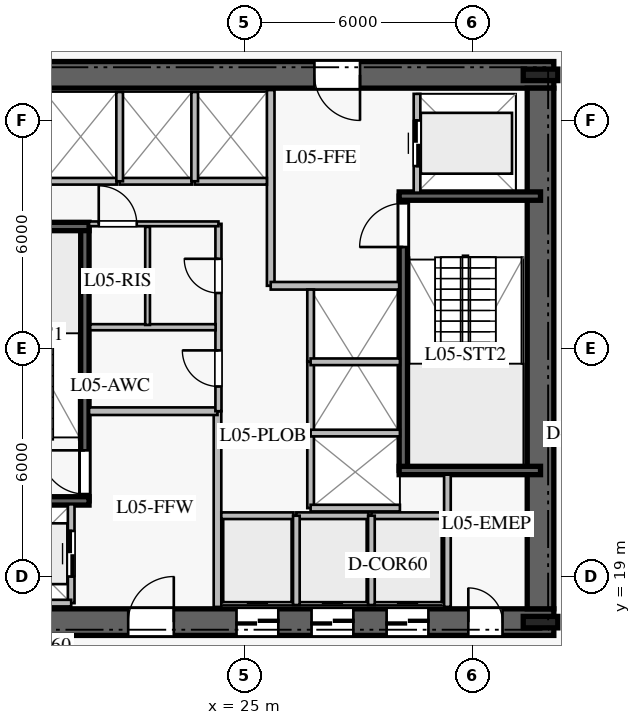
"""IFC4 building model, lengths in metres.
Left out: names, types, materials, properties, quantities, classifications, styles, units other than length and angle.
Written with IfcOpenShell. Run it as: python <this file> out.ifc"""

import sys

from ifc_helpers import new_model, si_unit, direction, frame, frame_2d, origin, origin_2d, place, context, subcontext, project, spatial, rectangle, i_section, extrude, element, fill, save


model = new_model("IFC4")
c1 = context("Model", 3, precision=1e-05, world=origin(), true_north=direction((0.0, 1.0)))
c2 = subcontext(c1, "Body", "Model", "MODEL_VIEW")
j1 = project(units=[si_unit("LENGTHUNIT", "METRE"), si_unit("PLANEANGLEUNIT", "RADIAN")], contexts=[c1])
p1 = place(None, origin())
s1 = spatial("IfcSite", under=j1, at=p1, CompositionType="ELEMENT")
p2 = place(p1, origin())
s2 = spatial("IfcBuilding", under=s1, at=p2, CompositionType="ELEMENT")
p3 = place(p2, frame((0.0, 0.0, 24.0)))
s3 = spatial("IfcBuildingStorey", under=s2, at=p3, CompositionType="ELEMENT", Elevation=24.0)
p4 = place(p3, frame((16.85, 17.8, 0.0), z_axis=(0.0, 0.0, 1.0), x_axis=(1.0, 0.0, 0.0)))
e1 = element("IfcWall", 1, at=p4, inside=s3, PredefinedType="SHEAR", context=c2, shape_type="SweptSolid", body=[
    extrude(rectangle(XDim=16.3, YDim=0.7, at=frame_2d((8.15, 0.0))), origin(), (0.0, 0.0, 1.0), 3.76),
])
p5 = place(p4, frame((5.1, 0.0, 0.0)))
e2 = element("IfcOpeningElement", 2, at=p5, cuts=e1, PredefinedType="OPENING", context=c2, shape_type="SweptSolid", body=[
    extrude(rectangle(XDim=1.2, YDim=2.25, at=frame_2d((0.6, 1.125))), frame((0.0, 0.36, 0.0), z_axis=(0.0, -1.0, 0.0), x_axis=(1.0, 0.0, 0.0)), (0.0, 0.0, 1.0), 0.72),
])
p6 = place(p4, frame((14.05, 0.0, 0.0)))
e3 = element("IfcOpeningElement", 3, at=p6, cuts=e1, PredefinedType="OPENING", context=c2, shape_type="SweptSolid", body=[
    extrude(rectangle(XDim=0.9, YDim=2.1, at=frame_2d((0.45, 1.05))), frame((0.0, 0.36, 0.0), z_axis=(0.0, -1.0, 0.0), x_axis=(1.0, 0.0, 0.0)), (0.0, 0.0, 1.0), 0.72),
])
p7 = place(p4, frame((7.95, 0.0, 0.0)))
e4 = element("IfcOpeningElement", 4, at=p7, cuts=e1, PredefinedType="OPENING", context=c2, shape_type="SweptSolid", body=[
    extrude(rectangle(XDim=1.1, YDim=2.2, at=frame_2d((0.55, 1.1))), frame((0.0, 0.36, 0.0), z_axis=(0.0, -1.0, 0.0), x_axis=(1.0, 0.0, 0.0)), (0.0, 0.0, 1.0), 0.72),
])
p8 = place(p4, frame((9.925, 0.0, 0.0)))
e5 = element("IfcOpeningElement", 5, at=p8, cuts=e1, PredefinedType="OPENING", context=c2, shape_type="SweptSolid", body=[
    extrude(rectangle(XDim=1.1, YDim=2.2, at=frame_2d((0.55, 1.1))), frame((0.0, 0.36, 0.0), z_axis=(0.0, -1.0, 0.0), x_axis=(1.0, 0.0, 0.0)), (0.0, 0.0, 1.0), 0.72),
])
p9 = place(p4, frame((11.9, 0.0, 0.0)))
e6 = element("IfcOpeningElement", 6, at=p9, cuts=e1, PredefinedType="OPENING", context=c2, shape_type="SweptSolid", body=[
    extrude(rectangle(XDim=1.1, YDim=2.2, at=frame_2d((0.55, 1.1))), frame((0.0, 0.36, 0.0), z_axis=(0.0, -1.0, 0.0), x_axis=(1.0, 0.0, 0.0)), (0.0, 0.0, 1.0), 0.72),
])
p10 = place(p3, frame((33.15, 32.2, 0.0), z_axis=(0.0, 0.0, 1.0), x_axis=(-1.0, 0.0, 0.0)))
e7 = element("IfcWall", 7, at=p10, inside=s3, PredefinedType="SHEAR", context=c2, shape_type="SweptSolid", body=[
    extrude(rectangle(XDim=16.3, YDim=0.7, at=frame_2d((8.15, 0.0))), origin(), (0.0, 0.0, 1.0), 3.76),
])
p11 = place(p10, frame((5.1, 0.0, 0.0)))
e8 = element("IfcOpeningElement", 8, at=p11, cuts=e7, PredefinedType="OPENING", context=c2, shape_type="SweptSolid", body=[
    extrude(rectangle(XDim=1.2, YDim=2.25, at=frame_2d((0.6, 1.125))), frame((0.0, 0.36, 0.0), z_axis=(0.0, -1.0, 0.0), x_axis=(1.0, 0.0, 0.0)), (0.0, 0.0, 1.0), 0.72),
])
p12 = place(p3, frame((32.8, 18.15, 0.0), z_axis=(0.0, 0.0, 1.0), x_axis=(0.0, 1.0, 0.0)))
e9 = element("IfcWall", 9, at=p12, inside=s3, PredefinedType="SHEAR", context=c2, shape_type="SweptSolid", body=[
    extrude(rectangle(XDim=13.7, YDim=0.7, at=frame_2d((6.85, 0.0))), origin(), (0.0, 0.0, 1.0), 3.76),
])
for number, where, z_axis, x_axis in (
    (10, (32.8, 17.8, 0.0), (0.0, 0.0, 1.0), (1.0, 0.0, 0.0)),
    (11, (32.8, 32.2, 0.0), (0.0, 0.0, 1.0), (1.0, 0.0, 0.0)),
):
    element("IfcColumn", number, at=place(p3, frame(where, z_axis=z_axis, x_axis=x_axis)), inside=s3, PredefinedType="COLUMN", context=c2, shape_type="SweptSolid", body=[
        extrude(i_section(OverallWidth=0.302, OverallDepth=0.91, WebThickness=0.021, FlangeThickness=0.04, at=origin_2d()), origin(), (0.0, 0.0, 1.0), 4.0),
    ])
p13 = place(p3, frame((20.81, 20.99, 0.0), z_axis=(0.0, 0.0, 1.0), x_axis=(0.0, 1.0, 0.0)))
e12 = element("IfcWall", 12, at=p13, inside=s3, PredefinedType="SOLIDWALL", context=c2, shape_type="SweptSolid", body=[
    extrude(rectangle(XDim=7.22, YDim=0.22, at=frame_2d((3.61, 0.0))), origin(), (0.0, 0.0, 1.0), 3.76),
])
p14 = place(p13, frame((0.18, 0.0, 0.0)))
e13 = element("IfcOpeningElement", 13, at=p14, cuts=e12, PredefinedType="OPENING", context=c2, shape_type="SweptSolid", body=[
    extrude(rectangle(XDim=1.15, YDim=2.2, at=frame_2d((0.575, 1.1))), frame((0.0, 0.12, 0.0), z_axis=(0.0, -1.0, 0.0), x_axis=(1.0, 0.0, 0.0)), (0.0, 0.0, 1.0), 0.24),
])
for number, where, z_axis, x_axis in (
    (14, (17.2, 20.99, 0.0), (0.0, 0.0, 1.0), (1.0, 0.0, 0.0)),
    (15, (17.2, 28.21, 0.0), (0.0, 0.0, 1.0), (1.0, 0.0, 0.0)),
):
    element("IfcWall", number, at=place(p3, frame(where, z_axis=z_axis, x_axis=x_axis)), inside=s3, PredefinedType="SOLIDWALL", context=c2, shape_type="SweptSolid", body=[
        extrude(rectangle(XDim=3.72, YDim=0.22, at=frame_2d((1.86, 0.0))), origin(), (0.0, 0.0, 1.0), 3.76),
    ])
p15 = place(p3, frame((29.19, 21.79, 0.0), z_axis=(0.0, 0.0, 1.0), x_axis=(0.0, 1.0, 0.0)))
e16 = element("IfcWall", 16, at=p15, inside=s3, PredefinedType="SOLIDWALL", context=c2, shape_type="SweptSolid", body=[
    extrude(rectangle(XDim=7.22, YDim=0.22, at=frame_2d((3.61, 0.0))), origin(), (0.0, 0.0, 1.0), 3.76),
])
p16 = place(p15, frame((5.88, 0.0, 0.0)))
e17 = element("IfcOpeningElement", 17, at=p16, cuts=e16, PredefinedType="OPENING", context=c2, shape_type="SweptSolid", body=[
    extrude(rectangle(XDim=1.15, YDim=2.2, at=frame_2d((0.575, 1.1))), frame((0.0, 0.12, 0.0), z_axis=(0.0, -1.0, 0.0), x_axis=(1.0, 0.0, 0.0)), (0.0, 0.0, 1.0), 0.24),
])
for number, where, z_axis, x_axis in (
    (18, (29.08, 21.79, 0.0), (0.0, 0.0, 1.0), (1.0, 0.0, 0.0)),
    (19, (29.08, 29.01, 0.0), (0.0, 0.0, 1.0), (1.0, 0.0, 0.0)),
):
    element("IfcWall", number, at=place(p3, frame(where, z_axis=z_axis, x_axis=x_axis)), inside=s3, PredefinedType="SOLIDWALL", context=c2, shape_type="SweptSolid", body=[
        extrude(rectangle(XDim=3.72, YDim=0.22, at=frame_2d((1.86, 0.0))), origin(), (0.0, 0.0, 1.0), 3.76),
    ])
p17 = place(p3, frame((24.3, 18.2, 0.0), z_axis=(0.0, 0.0, 1.0), x_axis=(0.0, 1.0, 0.0)))
e20 = element("IfcWall", 20, at=p17, inside=s3, PredefinedType="PARTITIONING", context=c2, shape_type="SweptSolid", body=[
    extrude(rectangle(XDim=5.15, YDim=0.2, at=frame_2d((2.575, 0.0))), origin(), (0.0, 0.0, 1.0), 3.76),
])
p18 = place(p3, frame((20.92, 23.35, 0.0), z_axis=(0.0, 0.0, 1.0), x_axis=(1.0, 0.0, 0.0)))
e21 = element("IfcWall", 21, at=p18, inside=s3, PredefinedType="PARTITIONING", context=c2, shape_type="SweptSolid", body=[
    extrude(rectangle(XDim=3.38, YDim=0.2, at=frame_2d((1.69, 0.0))), origin(), (0.0, 0.0, 1.0), 3.76),
])
p19 = place(p3, frame((25.7, 26.65, 0.0), z_axis=(0.0, 0.0, 1.0), x_axis=(0.0, 1.0, 0.0)))
e22 = element("IfcWall", 22, at=p19, inside=s3, PredefinedType="PARTITIONING", context=c2, shape_type="SweptSolid", body=[
    extrude(rectangle(XDim=5.15, YDim=0.2, at=frame_2d((2.575, 0.0))), origin(), (0.0, 0.0, 1.0), 3.76),
])
p20 = place(p3, frame((25.7, 26.65, 0.0), z_axis=(0.0, 0.0, 1.0), x_axis=(1.0, 0.0, 0.0)))
e23 = element("IfcWall", 23, at=p20, inside=s3, PredefinedType="PARTITIONING", context=c2, shape_type="SweptSolid", body=[
    extrude(rectangle(XDim=3.38, YDim=0.2, at=frame_2d((1.69, 0.0))), origin(), (0.0, 0.0, 1.0), 3.76),
])
p21 = place(p3, frame((24.325, 23.35, 0.0), z_axis=(0.0, 0.0, 1.0), x_axis=(0.0, 1.0, 0.0)))
e24 = element("IfcWall", 24, at=p21, inside=s3, PredefinedType="PLUMBINGWALL", context=c2, shape_type="SweptSolid", body=[
    extrude(rectangle(XDim=4.93, YDim=0.16, at=frame_2d((2.465, 0.0))), origin(), (0.0, 0.0, 1.0), 3.76),
])
p22 = place(p21, frame((0.65, 0.0, 0.0)))
e25 = element("IfcOpeningElement", 25, at=p22, cuts=e24, PredefinedType="OPENING", context=c2, shape_type="SweptSolid", body=[
    extrude(rectangle(XDim=0.95, YDim=2.1, at=frame_2d((0.475, 1.05))), frame((0.0, 0.09, 0.0), z_axis=(0.0, -1.0, 0.0), x_axis=(1.0, 0.0, 0.0)), (0.0, 0.0, 1.0), 0.18),
])
p23 = place(p21, frame((3.11, 0.0, 0.0)))
e26 = element("IfcOpeningElement", 26, at=p23, cuts=e24, PredefinedType="OPENING", context=c2, shape_type="SweptSolid", body=[
    extrude(rectangle(XDim=0.9, YDim=2.1, at=frame_2d((0.45, 1.05))), frame((0.0, 0.09, 0.0), z_axis=(0.0, -1.0, 0.0), x_axis=(1.0, 0.0, 0.0)), (0.0, 0.0, 1.0), 0.18),
])
p24 = place(p3, frame((20.92, 28.28, 0.0), z_axis=(0.0, 0.0, 1.0), x_axis=(1.0, 0.0, 0.0)))
e27 = element("IfcWall", 27, at=p24, inside=s3, PredefinedType="PARTITIONING", context=c2, shape_type="SweptSolid", body=[
    extrude(rectangle(XDim=3.405, YDim=0.125, at=frame_2d((1.703, 0.0))), origin(), (0.0, 0.0, 1.0), 3.76),
])
p25 = place(p24, frame((0.255, 0.0, 0.0)))
e28 = element("IfcOpeningElement", 28, at=p25, cuts=e27, PredefinedType="OPENING", context=c2, shape_type="SweptSolid", body=[
    extrude(rectangle(XDim=1.0, YDim=2.15, at=frame_2d((0.5, 1.075))), frame((0.0, 0.073, 0.0), z_axis=(0.0, -1.0, 0.0), x_axis=(1.0, 0.0, 0.0)), (0.0, 0.0, 1.0), 0.145),
])
p26 = place(p3, frame((20.95, 25.56, 0.0), z_axis=(0.0, 0.0, 1.0), x_axis=(1.0, 0.0, 0.0)))
e29 = element("IfcWall", 29, at=p26, inside=s3, PredefinedType="PLUMBINGWALL", context=c2, shape_type="SweptSolid", body=[
    extrude(rectangle(XDim=3.3, YDim=0.16, at=frame_2d((1.65, 0.0))), origin(), (0.0, 0.0, 1.0), 3.76),
])
p27 = place(p3, frame((22.46, 25.62, 0.0), z_axis=(0.0, 0.0, 1.0), x_axis=(0.0, 1.0, 0.0)))
e30 = element("IfcWall", 30, at=p27, inside=s3, PredefinedType="PARTITIONING", context=c2, shape_type="SweptSolid", body=[
    extrude(rectangle(XDim=2.58, YDim=0.125, at=frame_2d((1.29, 0.0))), origin(), (0.0, 0.0, 1.0), 3.76),
])
p28 = place(p3, frame((30.35, 18.2, 0.0), z_axis=(0.0, 0.0, 1.0), x_axis=(0.0, 1.0, 0.0)))
e31 = element("IfcWall", 31, at=p28, inside=s3, PredefinedType="PARTITIONING", context=c2, shape_type="SweptSolid", body=[
    extrude(rectangle(XDim=3.48, YDim=0.175, at=frame_2d((1.74, 0.0))), origin(), (0.0, 0.0, 1.0), 3.76),
])
p29 = place(p3, frame((24.4, 20.6, 0.0), z_axis=(0.0, 0.0, 1.0), x_axis=(1.0, 0.0, 0.0)))
e32 = element("IfcWall", 32, at=p29, inside=s3, PredefinedType="PARTITIONING", context=c2, shape_type="SweptSolid", body=[
    extrude(rectangle(XDim=1.9, YDim=0.175, at=frame_2d((0.95, 0.0))), origin(), (0.0, 0.0, 1.0), 3.76),
])
p30 = place(p3, frame((26.375, 20.6, 0.0), z_axis=(0.0, 0.0, 1.0), x_axis=(1.0, 0.0, 0.0)))
e33 = element("IfcWall", 33, at=p30, inside=s3, PredefinedType="PARTITIONING", context=c2, shape_type="SweptSolid", body=[
    extrude(rectangle(XDim=1.9, YDim=0.175, at=frame_2d((0.95, 0.0))), origin(), (0.0, 0.0, 1.0), 3.76),
])
p31 = place(p3, frame((26.375, 18.25, 0.0), z_axis=(0.0, 0.0, 1.0), x_axis=(0.0, 1.0, 0.0)))
e34 = element("IfcWall", 34, at=p31, inside=s3, PredefinedType="PARTITIONING", context=c2, shape_type="SweptSolid", body=[
    extrude(rectangle(XDim=2.35, YDim=0.175, at=frame_2d((1.175, 0.0))), origin(), (0.0, 0.0, 1.0), 3.76),
])
p32 = place(p3, frame((28.35, 20.6, 0.0), z_axis=(0.0, 0.0, 1.0), x_axis=(1.0, 0.0, 0.0)))
e35 = element("IfcWall", 35, at=p32, inside=s3, PredefinedType="PARTITIONING", context=c2, shape_type="SweptSolid", body=[
    extrude(rectangle(XDim=1.9, YDim=0.175, at=frame_2d((0.95, 0.0))), origin(), (0.0, 0.0, 1.0), 3.76),
])
p33 = place(p3, frame((28.35, 18.25, 0.0), z_axis=(0.0, 0.0, 1.0), x_axis=(0.0, 1.0, 0.0)))
e36 = element("IfcWall", 36, at=p33, inside=s3, PredefinedType="PARTITIONING", context=c2, shape_type="SweptSolid", body=[
    extrude(rectangle(XDim=2.35, YDim=0.175, at=frame_2d((1.175, 0.0))), origin(), (0.0, 0.0, 1.0), 3.76),
])
for number, where, z_axis, x_axis in (
    (37, (19.75, 29.4, 0.0), (0.0, 0.0, 1.0), (1.0, 0.0, 0.0)),
    (38, (21.725, 29.4, 0.0), (0.0, 0.0, 1.0), (1.0, 0.0, 0.0)),
):
    element("IfcWall", number, at=place(p3, frame(where, z_axis=z_axis, x_axis=x_axis)), inside=s3, PredefinedType="PARTITIONING", context=c2, shape_type="SweptSolid", body=[
        extrude(rectangle(XDim=1.9, YDim=0.175, at=frame_2d((0.95, 0.0))), origin(), (0.0, 0.0, 1.0), 3.76),
    ])
p34 = place(p3, frame((21.725, 29.4, 0.0), z_axis=(0.0, 0.0, 1.0), x_axis=(0.0, 1.0, 0.0)))
e39 = element("IfcWall", 39, at=p34, inside=s3, PredefinedType="PARTITIONING", context=c2, shape_type="SweptSolid", body=[
    extrude(rectangle(XDim=2.35, YDim=0.175, at=frame_2d((1.175, 0.0))), origin(), (0.0, 0.0, 1.0), 3.76),
])
p35 = place(p3, frame((23.7, 29.4, 0.0), z_axis=(0.0, 0.0, 1.0), x_axis=(1.0, 0.0, 0.0)))
e40 = element("IfcWall", 40, at=p35, inside=s3, PredefinedType="PARTITIONING", context=c2, shape_type="SweptSolid", body=[
    extrude(rectangle(XDim=1.9, YDim=0.175, at=frame_2d((0.95, 0.0))), origin(), (0.0, 0.0, 1.0), 3.76),
])
p36 = place(p3, frame((23.7, 29.4, 0.0), z_axis=(0.0, 0.0, 1.0), x_axis=(0.0, 1.0, 0.0)))
e41 = element("IfcWall", 41, at=p36, inside=s3, PredefinedType="PARTITIONING", context=c2, shape_type="SweptSolid", body=[
    extrude(rectangle(XDim=2.35, YDim=0.175, at=frame_2d((1.175, 0.0))), origin(), (0.0, 0.0, 1.0), 3.76),
])
p37 = place(p3, frame((26.75, 20.8, 0.0), z_axis=(0.0, 0.0, 1.0), x_axis=(0.0, 1.0, 0.0)))
e42 = element("IfcWall", 42, at=p37, inside=s3, PredefinedType="PARTITIONING", context=c2, shape_type="SweptSolid", body=[
    extrude(rectangle(XDim=1.9, YDim=0.175, at=frame_2d((0.95, 0.0))), origin(), (0.0, 0.0, 1.0), 3.76),
])
p38 = place(p3, frame((26.75, 20.8, 0.0), z_axis=(0.0, 0.0, 1.0), x_axis=(1.0, 0.0, 0.0)))
e43 = element("IfcWall", 43, at=p38, inside=s3, PredefinedType="PARTITIONING", context=c2, shape_type="SweptSolid", body=[
    extrude(rectangle(XDim=2.35, YDim=0.175, at=frame_2d((1.175, 0.0))), origin(), (0.0, 0.0, 1.0), 3.76),
])
p39 = place(p3, frame((26.75, 22.775, 0.0), z_axis=(0.0, 0.0, 1.0), x_axis=(0.0, 1.0, 0.0)))
e44 = element("IfcWall", 44, at=p39, inside=s3, PredefinedType="PARTITIONING", context=c2, shape_type="SweptSolid", body=[
    extrude(rectangle(XDim=1.9, YDim=0.175, at=frame_2d((0.95, 0.0))), origin(), (0.0, 0.0, 1.0), 3.76),
])
p40 = place(p3, frame((26.75, 22.775, 0.0), z_axis=(0.0, 0.0, 1.0), x_axis=(1.0, 0.0, 0.0)))
e45 = element("IfcWall", 45, at=p40, inside=s3, PredefinedType="PARTITIONING", context=c2, shape_type="SweptSolid", body=[
    extrude(rectangle(XDim=2.35, YDim=0.175, at=frame_2d((1.175, 0.0))), origin(), (0.0, 0.0, 1.0), 3.76),
])
p41 = place(p3, frame((26.75, 24.65, 0.0), z_axis=(0.0, 0.0, 1.0), x_axis=(0.0, 1.0, 0.0)))
e46 = element("IfcWall", 46, at=p41, inside=s3, PredefinedType="PARTITIONING", context=c2, shape_type="SweptSolid", body=[
    extrude(rectangle(XDim=1.9, YDim=0.175, at=frame_2d((0.95, 0.0))), origin(), (0.0, 0.0, 1.0), 3.76),
])
p42 = place(p3, frame((26.75, 24.65, 0.0), z_axis=(0.0, 0.0, 1.0), x_axis=(1.0, 0.0, 0.0)))
e47 = element("IfcWall", 47, at=p42, inside=s3, PredefinedType="PARTITIONING", context=c2, shape_type="SweptSolid", body=[
    extrude(rectangle(XDim=2.35, YDim=0.175, at=frame_2d((1.175, 0.0))), origin(), (0.0, 0.0, 1.0), 3.76),
])
p43 = place(p3, frame((20.45, 18.3, 0.0), z_axis=(0.0, 0.0, 1.0), x_axis=(0.0, 1.0, 0.0)))
e48 = element("IfcWall", 48, at=p43, inside=s3, PredefinedType="PARTITIONING", context=c2, shape_type="SweptSolid", body=[
    extrude(rectangle(XDim=2.6, YDim=0.175, at=frame_2d((1.3, 0.0))), origin(), (0.0, 0.0, 1.0), 3.76),
])
p44 = place(p43, frame((0.7, 0.0, 0.0)))
e49 = element("IfcOpeningElement", 49, at=p44, cuts=e48, PredefinedType="OPENING", context=c2, shape_type="SweptSolid", body=[
    extrude(rectangle(XDim=1.2, YDim=2.2, at=frame_2d((0.6, 1.1))), frame((0.0, 0.098, 0.0), z_axis=(0.0, -1.0, 0.0), x_axis=(1.0, 0.0, 0.0)), (0.0, 0.0, 1.0), 0.195),
])
p45 = place(p3, frame((17.85, 18.3, 0.0), z_axis=(0.0, 0.0, 1.0), x_axis=(1.0, 0.0, 0.0)))
e50 = element("IfcWall", 50, at=p45, inside=s3, PredefinedType="PARTITIONING", context=c2, shape_type="SweptSolid", body=[
    extrude(rectangle(XDim=2.6, YDim=0.175, at=frame_2d((1.3, 0.0))), origin(), (0.0, 0.0, 1.0), 3.76),
])
p46 = place(p3, frame((29.55, 29.1, 0.0), z_axis=(0.0, 0.0, 1.0), x_axis=(0.0, 1.0, 0.0)))
e51 = element("IfcWall", 51, at=p46, inside=s3, PredefinedType="PARTITIONING", context=c2, shape_type="SweptSolid", body=[
    extrude(rectangle(XDim=2.6, YDim=0.175, at=frame_2d((1.3, 0.0))), origin(), (0.0, 0.0, 1.0), 3.76),
])
p47 = place(p46, frame((0.7, 0.0, 0.0)))
e52 = element("IfcOpeningElement", 52, at=p47, cuts=e51, PredefinedType="OPENING", context=c2, shape_type="SweptSolid", body=[
    extrude(rectangle(XDim=1.2, YDim=2.2, at=frame_2d((0.6, 1.1))), frame((0.0, 0.098, 0.0), z_axis=(0.0, -1.0, 0.0), x_axis=(1.0, 0.0, 0.0)), (0.0, 0.0, 1.0), 0.195),
])
p48 = place(p3, frame((7.599, 19.256, 0.0), z_axis=(0.0, 0.0, 1.0), x_axis=(0.828641341799, -0.559779891262, 0.0)))
e53 = element("IfcWall", 53, at=p48, inside=s3, PredefinedType="PARTITIONING", context=c2, shape_type="SweptSolid", body=[
    extrude(rectangle(XDim=17.123, YDim=0.125, at=frame_2d((8.562, 0.0))), origin(), (0.0, 0.0, 1.0), 3.21),
])
p49 = place(p48, frame((8.062, 0.0, 0.0)))
e54 = element("IfcOpeningElement", 54, at=p49, cuts=e53, PredefinedType="OPENING", context=c2, shape_type="SweptSolid", body=[
    extrude(rectangle(XDim=1.0, YDim=2.15, at=frame_2d((0.5, 1.075))), frame((0.0, 0.073, 0.0), z_axis=(0.0, -1.0, 0.0), x_axis=(1.0, 0.0, 0.0)), (0.0, 0.0, 1.0), 0.145),
])
p50 = place(p14, origin())
e55 = element("IfcDoor", 55, at=p50, inside=s3, OperationType="SINGLE_SWING_RIGHT", PredefinedType="DOOR", context=c2, shape_type="SweptSolid", body=[
    extrude(rectangle(XDim=1.15, YDim=2.2, at=frame_2d((0.575, 1.1))), frame((0.0, 0.025, 0.0), z_axis=(0.0, -1.0, 0.0), x_axis=(1.0, 0.0, 0.0)), (0.0, 0.0, 1.0), 0.05),
])
fill(e13, e55)
p51 = place(p16, origin())
e56 = element("IfcDoor", 56, at=p51, inside=s3, OperationType="SINGLE_SWING_LEFT", PredefinedType="DOOR", context=c2, shape_type="SweptSolid", body=[
    extrude(rectangle(XDim=1.15, YDim=2.2, at=frame_2d((0.575, 1.1))), frame((0.0, 0.025, 0.0), z_axis=(0.0, -1.0, 0.0), x_axis=(1.0, 0.0, 0.0)), (0.0, 0.0, 1.0), 0.05),
])
fill(e17, e56)
p52 = place(p5, origin())
e57 = element("IfcDoor", 57, at=p52, inside=s3, OperationType="SINGLE_SWING_RIGHT", PredefinedType="DOOR", context=c2, shape_type="SweptSolid", body=[
    extrude(rectangle(XDim=1.2, YDim=2.25, at=frame_2d((0.6, 1.125))), frame((0.0, 0.025, 0.0), z_axis=(0.0, -1.0, 0.0), x_axis=(1.0, 0.0, 0.0)), (0.0, 0.0, 1.0), 0.05),
])
fill(e2, e57)
p53 = place(p11, origin())
e58 = element("IfcDoor", 58, at=p53, inside=s3, OperationType="SINGLE_SWING_LEFT", PredefinedType="DOOR", context=c2, shape_type="SweptSolid", body=[
    extrude(rectangle(XDim=1.2, YDim=2.25, at=frame_2d((0.6, 1.125))), frame((0.0, 0.025, 0.0), z_axis=(0.0, -1.0, 0.0), x_axis=(1.0, 0.0, 0.0)), (0.0, 0.0, 1.0), 0.05),
])
fill(e8, e58)
p54 = place(p22, origin())
e59 = element("IfcDoor", 59, at=p54, inside=s3, OperationType="SINGLE_SWING_RIGHT", PredefinedType="DOOR", context=c2, shape_type="SweptSolid", body=[
    extrude(rectangle(XDim=0.95, YDim=2.1, at=frame_2d((0.475, 1.05))), frame((0.0, 0.025, 0.0), z_axis=(0.0, -1.0, 0.0), x_axis=(1.0, 0.0, 0.0)), (0.0, 0.0, 1.0), 0.05),
])
fill(e25, e59)
p55 = place(p25, origin())
e60 = element("IfcDoor", 60, at=p55, inside=s3, OperationType="SINGLE_SWING_LEFT", PredefinedType="DOOR", context=c2, shape_type="SweptSolid", body=[
    extrude(rectangle(XDim=1.0, YDim=2.15, at=frame_2d((0.5, 1.075))), frame((0.0, 0.025, 0.0), z_axis=(0.0, -1.0, 0.0), x_axis=(1.0, 0.0, 0.0)), (0.0, 0.0, 1.0), 0.05),
])
fill(e28, e60)
p56 = place(p23, origin())
e61 = element("IfcDoor", 61, at=p56, inside=s3, OperationType="SINGLE_SWING_RIGHT", PredefinedType="DOOR", context=c2, shape_type="SweptSolid", body=[
    extrude(rectangle(XDim=0.9, YDim=2.1, at=frame_2d((0.45, 1.05))), frame((0.0, 0.025, 0.0), z_axis=(0.0, -1.0, 0.0), x_axis=(1.0, 0.0, 0.0)), (0.0, 0.0, 1.0), 0.05),
])
fill(e26, e61)
p57 = place(p6, origin())
e62 = element("IfcDoor", 62, at=p57, inside=s3, OperationType="SINGLE_SWING_LEFT", PredefinedType="DOOR", context=c2, shape_type="SweptSolid", body=[
    extrude(rectangle(XDim=0.9, YDim=2.1, at=frame_2d((0.45, 1.05))), frame((0.0, 0.025, 0.0), z_axis=(0.0, -1.0, 0.0), x_axis=(1.0, 0.0, 0.0)), (0.0, 0.0, 1.0), 0.05),
])
fill(e3, e62)
p58 = place(p7, origin())
e63 = element("IfcDoor", 63, at=p58, inside=s3, OperationType="DOUBLE_DOOR_SLIDING", PredefinedType="DOOR", context=c2, shape_type="SweptSolid", body=[
    extrude(rectangle(XDim=1.1, YDim=2.2, at=frame_2d((0.55, 1.1))), frame((0.0, 0.025, 0.0), z_axis=(0.0, -1.0, 0.0), x_axis=(1.0, 0.0, 0.0)), (0.0, 0.0, 1.0), 0.05),
])
fill(e4, e63)
p59 = place(p8, origin())
e64 = element("IfcDoor", 64, at=p59, inside=s3, OperationType="DOUBLE_DOOR_SLIDING", PredefinedType="DOOR", context=c2, shape_type="SweptSolid", body=[
    extrude(rectangle(XDim=1.1, YDim=2.2, at=frame_2d((0.55, 1.1))), frame((0.0, 0.025, 0.0), z_axis=(0.0, -1.0, 0.0), x_axis=(1.0, 0.0, 0.0)), (0.0, 0.0, 1.0), 0.05),
])
fill(e5, e64)
p60 = place(p9, origin())
e65 = element("IfcDoor", 65, at=p60, inside=s3, OperationType="DOUBLE_DOOR_SLIDING", PredefinedType="DOOR", context=c2, shape_type="SweptSolid", body=[
    extrude(rectangle(XDim=1.1, YDim=2.2, at=frame_2d((0.55, 1.1))), frame((0.0, 0.025, 0.0), z_axis=(0.0, -1.0, 0.0), x_axis=(1.0, 0.0, 0.0)), (0.0, 0.0, 1.0), 0.05),
])
fill(e6, e65)
p61 = place(p44, origin())
e66 = element("IfcDoor", 66, at=p61, inside=s3, OperationType="DOUBLE_DOOR_SLIDING", PredefinedType="DOOR", context=c2, shape_type="SweptSolid", body=[
    extrude(rectangle(XDim=1.2, YDim=2.2, at=frame_2d((0.6, 1.1))), frame((0.0, 0.025, 0.0), z_axis=(0.0, -1.0, 0.0), x_axis=(1.0, 0.0, 0.0)), (0.0, 0.0, 1.0), 0.05),
])
fill(e49, e66)
p62 = place(p47, origin())
e67 = element("IfcDoor", 67, at=p62, inside=s3, OperationType="DOUBLE_DOOR_SLIDING", PredefinedType="DOOR", context=c2, shape_type="SweptSolid", body=[
    extrude(rectangle(XDim=1.2, YDim=2.2, at=frame_2d((0.6, 1.1))), frame((0.0, 0.025, 0.0), z_axis=(0.0, -1.0, 0.0), x_axis=(1.0, 0.0, 0.0)), (0.0, 0.0, 1.0), 0.05),
])
fill(e52, e67)
save(model, sys.argv[1])
